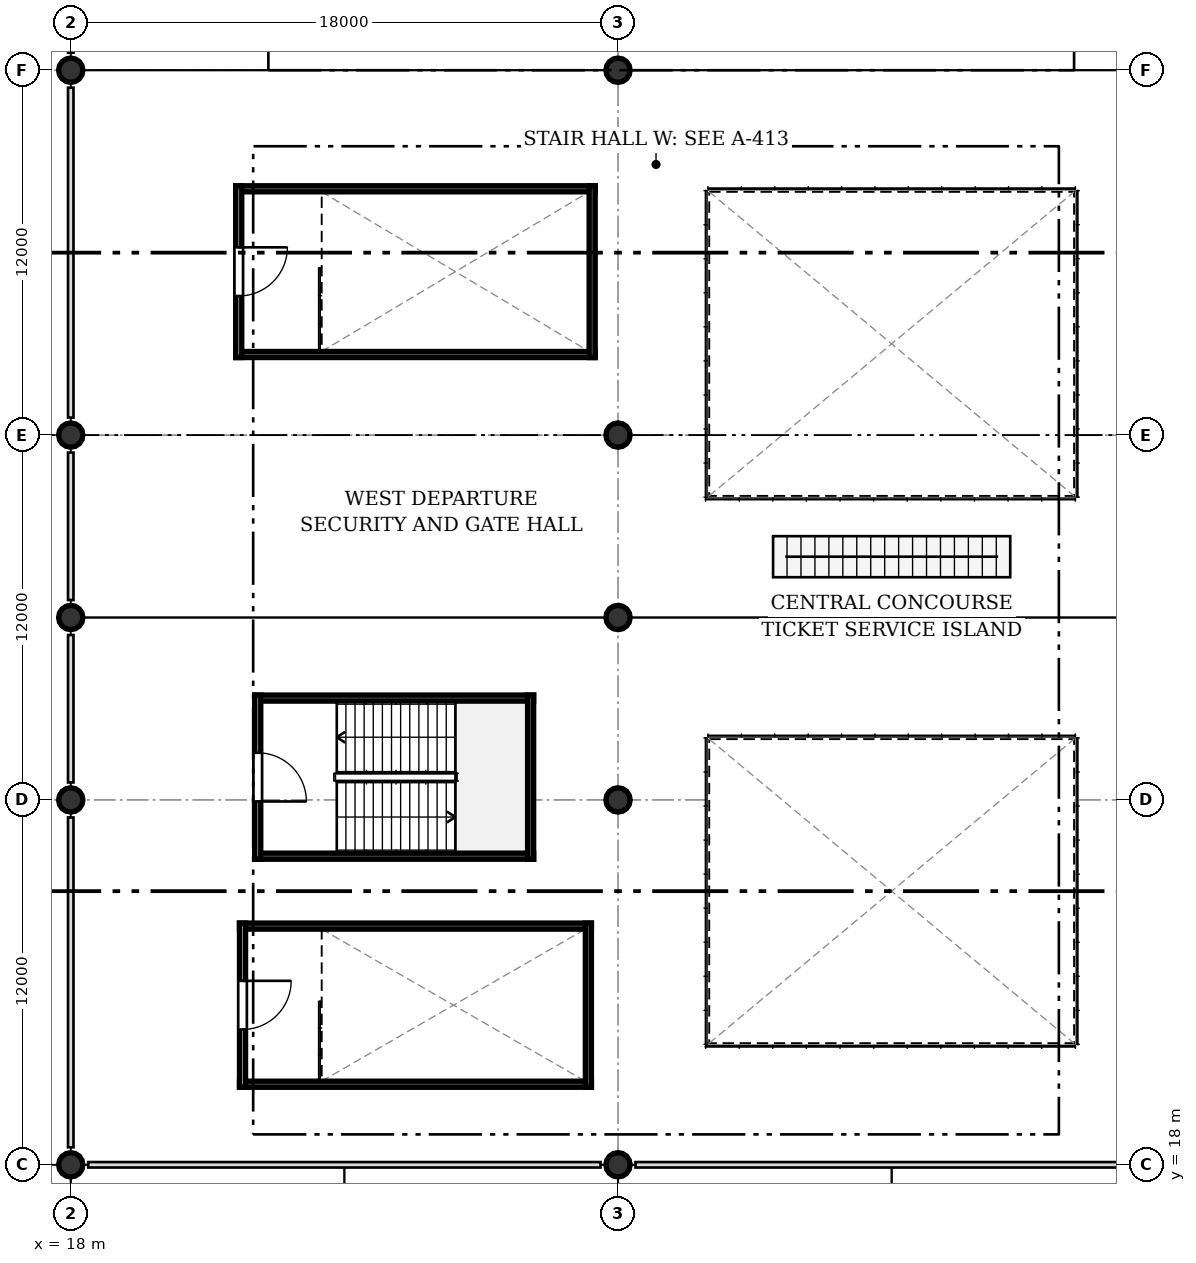
"""IFC4 building model, lengths in metres.
Left out: names, types, materials, properties, quantities, classifications, styles, units other than length and angle.
Written with IfcOpenShell. Run it as: python <this file> out.ifc"""

import sys

from ifc_helpers import new_model, si_unit, direction, frame, frame_2d, origin, origin_2d, place, context, subcontext, project, spatial, rectangle, circle, extrude, element, fill, save


model = new_model("IFC4")
c1 = context("Model", 3, precision=1e-05, world=origin(), true_north=direction((0.0, 1.0)))
c2 = subcontext(c1, "Body", "Model", "MODEL_VIEW")
j1 = project(units=[si_unit("LENGTHUNIT", "METRE"), si_unit("PLANEANGLEUNIT", "RADIAN")], contexts=[c1])
p1 = place(None, origin())
s1 = spatial("IfcSite", under=j1, at=p1, CompositionType="ELEMENT")
p2 = place(p1, origin())
s2 = spatial("IfcBuilding", under=s1, at=p2, CompositionType="ELEMENT")
p3 = place(p2, frame((0.0, 0.0, 6.6)))
s3 = spatial("IfcBuildingStorey", under=s2, at=p3, CompositionType="ELEMENT", Elevation=6.6)
for number, where, z_axis, x_axis in (
    (1, (18.0, 18.0, 0.0), (0.0, 0.0, 1.0), (1.0, 0.0, 0.0)),
    (2, (18.0, 30.0, 0.0), (0.0, 0.0, 1.0), (1.0, 0.0, 0.0)),
    (3, (18.0, 36.0, 0.0), (0.0, 0.0, 1.0), (1.0, 0.0, 0.0)),
    (4, (18.0, 42.0, 0.0), (0.0, 0.0, 1.0), (1.0, 0.0, 0.0)),
    (5, (18.0, 54.0, 0.0), (0.0, 0.0, 1.0), (1.0, 0.0, 0.0)),
    (6, (36.0, 18.0, 0.0), (0.0, 0.0, 1.0), (1.0, 0.0, 0.0)),
    (7, (36.0, 30.0, 0.0), (0.0, 0.0, 1.0), (1.0, 0.0, 0.0)),
    (8, (36.0, 36.0, 0.0), (0.0, 0.0, 1.0), (1.0, 0.0, 0.0)),
    (9, (36.0, 42.0, 0.0), (0.0, 0.0, 1.0), (1.0, 0.0, 0.0)),
    (10, (36.0, 54.0, 0.0), (0.0, 0.0, 1.0), (1.0, 0.0, 0.0)),
):
    element("IfcColumn", number, at=place(p3, frame(where, z_axis=z_axis, x_axis=x_axis)), inside=s3, PredefinedType="COLUMN", context=c2, shape_type="SweptSolid", body=[
        extrude(circle(Radius=0.4, at=origin_2d()), origin(), (0.0, 0.0, 1.0), 4.2),
    ])
for number, where, z_axis, x_axis in (
    (11, (23.55, 20.65, 0.0), (0.0, 0.0, 1.0), (1.0, 0.0, 0.0)),
    (12, (35.125, 25.85, 0.0), (0.0, 0.0, 1.0), (-1.0, 0.0, 0.0)),
):
    element("IfcWall", number, at=place(p3, frame(where, z_axis=z_axis, x_axis=x_axis)), inside=s3, PredefinedType="SOLIDWALL", context=c2, shape_type="SweptSolid", body=[
        extrude(rectangle(XDim=11.575, YDim=0.2, at=frame_2d((5.788, 0.0))), origin(), (0.0, 0.0, 1.0), 2.45),
    ])
p4 = place(p3, frame((35.025, 20.55, 0.0), z_axis=(0.0, 0.0, 1.0), x_axis=(0.0, 1.0, 0.0)))
e13 = element("IfcWall", 13, at=p4, inside=s3, PredefinedType="SOLIDWALL", context=c2, shape_type="SweptSolid", body=[
    extrude(rectangle(XDim=5.4, YDim=0.2, at=frame_2d((2.7, 0.0))), origin(), (0.0, 0.0, 1.0), 2.45),
])
p5 = place(p3, frame((23.65, 25.95, 0.0), z_axis=(0.0, 0.0, 1.0), x_axis=(0.0, -1.0, 0.0)))
e14 = element("IfcWall", 14, at=p5, inside=s3, PredefinedType="SOLIDWALL", context=c2, shape_type="SweptSolid", body=[
    extrude(rectangle(XDim=5.4, YDim=0.2, at=frame_2d((2.7, 0.0))), origin(), (0.0, 0.0, 1.0), 2.45),
])
p6 = place(p5, frame((1.9, 0.0, 0.0)))
e15 = element("IfcOpeningElement", 15, at=p6, cuts=e14, PredefinedType="OPENING", context=c2, shape_type="SweptSolid", body=[
    extrude(rectangle(XDim=1.6, YDim=2.15, at=frame_2d((0.8, 1.075))), frame((0.0, 0.11, 0.0), z_axis=(0.0, -1.0, 0.0), x_axis=(1.0, 0.0, 0.0)), (0.0, 0.0, 1.0), 0.22),
])
for number, where, z_axis, x_axis in (
    (16, (23.425, 44.65, 0.0), (0.0, 0.0, 1.0), (1.0, 0.0, 0.0)),
    (17, (35.25, 50.1, 0.0), (0.0, 0.0, 1.0), (-1.0, 0.0, 0.0)),
):
    element("IfcWall", number, at=place(p3, frame(where, z_axis=z_axis, x_axis=x_axis)), inside=s3, PredefinedType="SOLIDWALL", context=c2, shape_type="SweptSolid", body=[
        extrude(rectangle(XDim=11.825, YDim=0.2, at=frame_2d((5.913, 0.0))), origin(), (0.0, 0.0, 1.0), 2.45),
    ])
p7 = place(p3, frame((35.15, 44.55, 0.0), z_axis=(0.0, 0.0, 1.0), x_axis=(0.0, 1.0, 0.0)))
e18 = element("IfcWall", 18, at=p7, inside=s3, PredefinedType="SOLIDWALL", context=c2, shape_type="SweptSolid", body=[
    extrude(rectangle(XDim=5.65, YDim=0.2, at=frame_2d((2.825, 0.0))), origin(), (0.0, 0.0, 1.0), 2.45),
])
p8 = place(p3, frame((23.525, 50.2, 0.0), z_axis=(0.0, 0.0, 1.0), x_axis=(0.0, -1.0, 0.0)))
e19 = element("IfcWall", 19, at=p8, inside=s3, PredefinedType="SOLIDWALL", context=c2, shape_type="SweptSolid", body=[
    extrude(rectangle(XDim=5.65, YDim=0.2, at=frame_2d((2.825, 0.0))), origin(), (0.0, 0.0, 1.0), 2.45),
])
p9 = place(p8, frame((2.025, 0.0, 0.0)))
e20 = element("IfcOpeningElement", 20, at=p9, cuts=e19, PredefinedType="OPENING", context=c2, shape_type="SweptSolid", body=[
    extrude(rectangle(XDim=1.6, YDim=2.15, at=frame_2d((0.8, 1.075))), frame((0.0, 0.11, 0.0), z_axis=(0.0, -1.0, 0.0), x_axis=(1.0, 0.0, 0.0)), (0.0, 0.0, 1.0), 0.22),
])
for number, where, z_axis, x_axis in (
    (21, (24.05, 28.15, 0.0), (0.0, 0.0, 1.0), (1.0, 0.0, 0.0)),
    (22, (33.225, 33.35, 0.0), (0.0, 0.0, 1.0), (-1.0, 0.0, 0.0)),
):
    element("IfcWall", number, at=place(p3, frame(where, z_axis=z_axis, x_axis=x_axis)), inside=s3, PredefinedType="SOLIDWALL", context=c2, shape_type="SweptSolid", body=[
        extrude(rectangle(XDim=9.175, YDim=0.2, at=frame_2d((4.587, 0.0))), origin(), (0.0, 0.0, 1.0), 3.98),
    ])
p10 = place(p3, frame((33.125, 28.05, 0.0), z_axis=(0.0, 0.0, 1.0), x_axis=(0.0, 1.0, 0.0)))
e23 = element("IfcWall", 23, at=p10, inside=s3, PredefinedType="SOLIDWALL", context=c2, shape_type="SweptSolid", body=[
    extrude(rectangle(XDim=5.4, YDim=0.2, at=frame_2d((2.7, 0.0))), origin(), (0.0, 0.0, 1.0), 3.98),
])
p11 = place(p3, frame((24.15, 33.45, 0.0), z_axis=(0.0, 0.0, 1.0), x_axis=(0.0, -1.0, 0.0)))
e24 = element("IfcWall", 24, at=p11, inside=s3, PredefinedType="SOLIDWALL", context=c2, shape_type="SweptSolid", body=[
    extrude(rectangle(XDim=5.4, YDim=0.2, at=frame_2d((2.7, 0.0))), origin(), (0.0, 0.0, 1.0), 3.955),
])
p12 = place(p11, frame((1.9, 0.0, 0.0)))
e25 = element("IfcOpeningElement", 25, at=p12, cuts=e24, PredefinedType="OPENING", context=c2, shape_type="SweptSolid", body=[
    extrude(rectangle(XDim=1.6, YDim=2.15, at=frame_2d((0.8, 1.075))), frame((0.0, 0.11, 0.0), z_axis=(0.0, -1.0, 0.0), x_axis=(1.0, 0.0, 0.0)), (0.0, 0.0, 1.0), 0.22),
])
p13 = place(p6, origin())
e26 = element("IfcDoor", 26, at=p13, inside=s3, OperationType="SINGLE_SWING_LEFT", PredefinedType="DOOR", context=c2, shape_type="SweptSolid", body=[
    extrude(rectangle(XDim=1.6, YDim=2.15, at=frame_2d((0.8, 1.075))), frame((0.0, 0.025, 0.0), z_axis=(0.0, -1.0, 0.0), x_axis=(1.0, 0.0, 0.0)), (0.0, 0.0, 1.0), 0.05),
])
fill(e15, e26)
p14 = place(p9, origin())
e27 = element("IfcDoor", 27, at=p14, inside=s3, OperationType="SINGLE_SWING_LEFT", PredefinedType="DOOR", context=c2, shape_type="SweptSolid", body=[
    extrude(rectangle(XDim=1.6, YDim=2.15, at=frame_2d((0.8, 1.075))), frame((0.0, 0.025, 0.0), z_axis=(0.0, -1.0, 0.0), x_axis=(1.0, 0.0, 0.0)), (0.0, 0.0, 1.0), 0.05),
])
fill(e20, e27)
p15 = place(p12, origin())
e28 = element("IfcDoor", 28, at=p15, inside=s3, OperationType="SINGLE_SWING_RIGHT", PredefinedType="DOOR", context=c2, shape_type="SweptSolid", body=[
    extrude(rectangle(XDim=1.6, YDim=2.15, at=frame_2d((0.8, 1.075))), frame((0.0, 0.025, 0.0), z_axis=(0.0, -1.0, 0.0), x_axis=(1.0, 0.0, 0.0)), (0.0, 0.0, 1.0), 0.05),
])
fill(e25, e28)
save(model, sys.argv[1])
